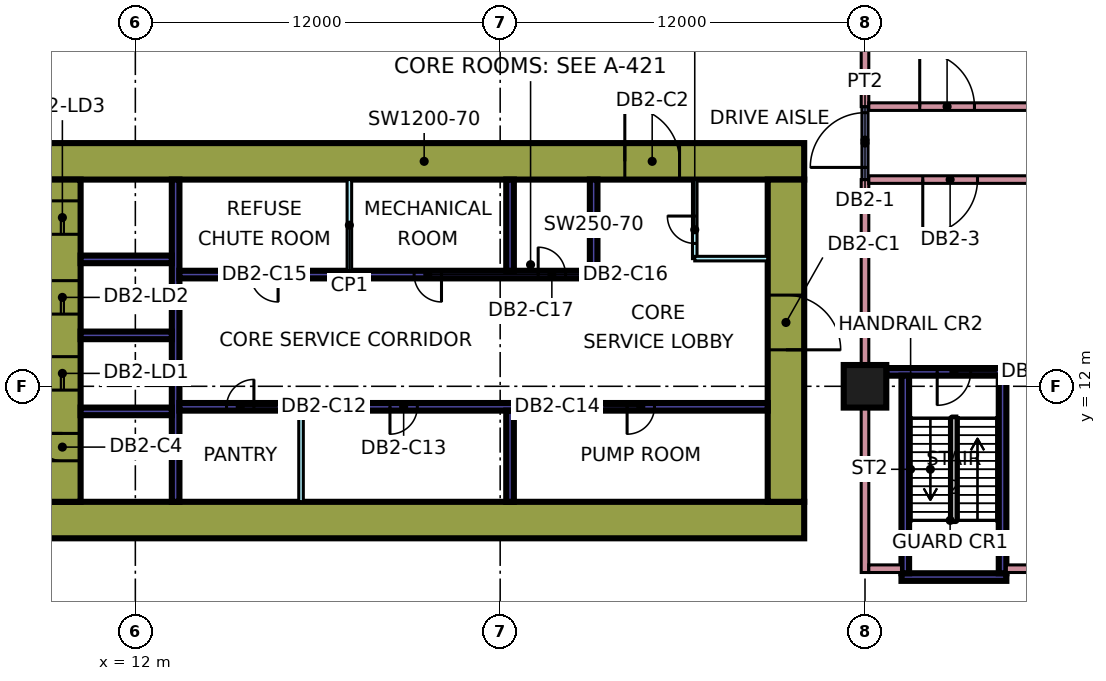
"""IFC4 building model, lengths in metres.
Left out: names, types, materials, properties, quantities, classifications, styles, units other than length and angle.
Written with IfcOpenShell. Run it as: python <this file> out.ifc"""

import sys

from ifc_helpers import new_model, si_unit, direction, frame, frame_2d, origin, origin_2d, place, context, subcontext, project, spatial, rectangle, extrude, element, fill, save


model = new_model("IFC4")
c1 = context("Model", 3, precision=1e-05, world=origin(), true_north=direction((0.0, 1.0)))
c2 = subcontext(c1, "Body", "Model", "MODEL_VIEW")
j1 = project(units=[si_unit("LENGTHUNIT", "METRE"), si_unit("PLANEANGLEUNIT", "RADIAN")], contexts=[c1])
p1 = place(None, origin())
s1 = spatial("IfcSite", under=j1, at=p1, CompositionType="ELEMENT")
p2 = place(p1, origin())
s2 = spatial("IfcBuilding", under=s1, at=p2, CompositionType="ELEMENT")
p3 = place(p2, frame((0.0, 0.0, -9.0)))
s3 = spatial("IfcBuildingStorey", under=s2, at=p3, CompositionType="ELEMENT", Elevation=-9.0)
p4 = place(p3, frame((36.0, 12.0, 0.0), z_axis=(0.0, 0.0, 1.0), x_axis=(1.0, 0.0, 0.0)))
e1 = element("IfcColumn", 1, at=p4, inside=s3, PredefinedType="COLUMN", context=c2, shape_type="SweptSolid", body=[
    extrude(rectangle(XDim=1.4, YDim=1.4, at=origin_2d()), origin(), (0.0, 0.0, 1.0), 4.5),
])
p5 = place(p3, frame((9.0, 7.6, 0.0), z_axis=(0.0, 0.0, 1.0), x_axis=(1.0, 0.0, 0.0)))
e2 = element("IfcWall", 2, at=p5, inside=s3, PredefinedType="SHEAR", context=c2, shape_type="SweptSolid", body=[
    extrude(rectangle(XDim=25.0, YDim=1.2, at=frame_2d((12.5, 0.0))), origin(), (0.0, 0.0, 1.0), 4.5),
])
p6 = place(p3, frame((9.0, 19.4, 0.0), z_axis=(0.0, 0.0, 1.0), x_axis=(1.0, 0.0, 0.0)))
e3 = element("IfcWall", 3, at=p6, inside=s3, PredefinedType="SHEAR", context=c2, shape_type="SweptSolid", body=[
    extrude(rectangle(XDim=25.0, YDim=1.2, at=frame_2d((12.5, 0.0))), origin(), (0.0, 0.0, 1.0), 4.5),
])
p7 = place(p6, frame((19.1, 0.0, 0.0)))
e4 = element("IfcOpeningElement", 4, at=p7, cuts=e3, PredefinedType="OPENING", context=c2, shape_type="SweptSolid", body=[
    extrude(rectangle(XDim=1.8, YDim=2.4, at=frame_2d((0.9, 1.2))), frame((0.0, 0.61, 0.0), z_axis=(0.0, -1.0, 0.0), x_axis=(1.0, 0.0, 0.0)), (0.0, 0.0, 1.0), 1.22),
])
p8 = place(p3, frame((9.6, 8.2, 0.0), z_axis=(0.0, 0.0, 1.0), x_axis=(0.0, 1.0, 0.0)))
e5 = element("IfcWall", 5, at=p8, inside=s3, PredefinedType="SHEAR", context=c2, shape_type="SweptSolid", body=[
    extrude(rectangle(XDim=10.6, YDim=1.2, at=frame_2d((5.3, 0.0))), origin(), (0.0, 0.0, 1.0), 4.5),
])
p9 = place(p8, frame((3.675, 0.0, 0.0)))
e6 = element("IfcOpeningElement", 6, at=p9, cuts=e5, PredefinedType="OPENING", context=c2, shape_type="SweptSolid", body=[
    extrude(rectangle(XDim=1.1, YDim=2.2, at=frame_2d((0.55, 1.1))), frame((0.0, 0.61, 0.0), z_axis=(0.0, -1.0, 0.0), x_axis=(1.0, 0.0, 0.0)), (0.0, 0.0, 1.0), 1.22),
])
p10 = place(p8, frame((6.175, 0.0, 0.0)))
e7 = element("IfcOpeningElement", 7, at=p10, cuts=e5, PredefinedType="OPENING", context=c2, shape_type="SweptSolid", body=[
    extrude(rectangle(XDim=1.1, YDim=2.2, at=frame_2d((0.55, 1.1))), frame((0.0, 0.61, 0.0), z_axis=(0.0, -1.0, 0.0), x_axis=(1.0, 0.0, 0.0)), (0.0, 0.0, 1.0), 1.22),
])
p11 = place(p8, frame((8.8, 0.0, 0.0)))
e8 = element("IfcOpeningElement", 8, at=p11, cuts=e5, PredefinedType="OPENING", context=c2, shape_type="SweptSolid", body=[
    extrude(rectangle(XDim=1.1, YDim=2.2, at=frame_2d((0.55, 1.1))), frame((0.0, 0.61, 0.0), z_axis=(0.0, -1.0, 0.0), x_axis=(1.0, 0.0, 0.0)), (0.0, 0.0, 1.0), 1.22),
])
p12 = place(p8, frame((1.35, 0.0, 0.0)))
e9 = element("IfcOpeningElement", 9, at=p12, cuts=e5, PredefinedType="OPENING", context=c2, shape_type="SweptSolid", body=[
    extrude(rectangle(XDim=0.9, YDim=2.1, at=frame_2d((0.45, 1.05))), frame((0.0, 0.61, 0.0), z_axis=(0.0, -1.0, 0.0), x_axis=(1.0, 0.0, 0.0)), (0.0, 0.0, 1.0), 1.22),
])
p13 = place(p3, frame((33.4, 8.2, 0.0), z_axis=(0.0, 0.0, 1.0), x_axis=(0.0, 1.0, 0.0)))
e10 = element("IfcWall", 10, at=p13, inside=s3, PredefinedType="SHEAR", context=c2, shape_type="SweptSolid", body=[
    extrude(rectangle(XDim=10.6, YDim=1.2, at=frame_2d((5.3, 0.0))), origin(), (0.0, 0.0, 1.0), 4.5),
])
p14 = place(p13, frame((5.0, 0.0, 0.0)))
e11 = element("IfcOpeningElement", 11, at=p14, cuts=e10, PredefinedType="OPENING", context=c2, shape_type="SweptSolid", body=[
    extrude(rectangle(XDim=1.8, YDim=2.4, at=frame_2d((0.9, 1.2))), frame((0.0, 0.61, 0.0), z_axis=(0.0, -1.0, 0.0), x_axis=(1.0, 0.0, 0.0)), (0.0, 0.0, 1.0), 1.22),
])
p15 = place(p3, frame((13.325, 8.2, 0.0), z_axis=(0.0, 0.0, 1.0), x_axis=(0.0, 1.0, 0.0)))
e12 = element("IfcWall", 12, at=p15, inside=s3, PredefinedType="SHEAR", context=c2, shape_type="SweptSolid", body=[
    extrude(rectangle(XDim=10.6, YDim=0.25, at=frame_2d((5.3, 0.0))), origin(), (0.0, 0.0, 1.0), 4.5),
])
p16 = place(p3, frame((13.45, 11.325, 0.0), z_axis=(0.0, 0.0, 1.0), x_axis=(1.0, 0.0, 0.0)))
e13 = element("IfcWall", 13, at=p16, inside=s3, PredefinedType="SHEAR", context=c2, shape_type="SweptSolid", body=[
    extrude(rectangle(XDim=19.35, YDim=0.25, at=frame_2d((9.675, 0.0))), origin(), (0.0, 0.0, 1.0), 4.5),
])
p17 = place(p16, frame((1.55, 0.0, 0.0)))
e14 = element("IfcOpeningElement", 14, at=p17, cuts=e13, PredefinedType="OPENING", context=c2, shape_type="SweptSolid", body=[
    extrude(rectangle(XDim=0.9, YDim=2.1, at=frame_2d((0.45, 1.05))), frame((0.0, 0.135, 0.0), z_axis=(0.0, -1.0, 0.0), x_axis=(1.0, 0.0, 0.0)), (0.0, 0.0, 1.0), 0.27),
])
p18 = place(p16, frame((6.925, 0.0, 0.0)))
e15 = element("IfcOpeningElement", 15, at=p18, cuts=e13, PredefinedType="OPENING", context=c2, shape_type="SweptSolid", body=[
    extrude(rectangle(XDim=0.9, YDim=2.1, at=frame_2d((0.45, 1.05))), frame((0.0, 0.135, 0.0), z_axis=(0.0, -1.0, 0.0), x_axis=(1.0, 0.0, 0.0)), (0.0, 0.0, 1.0), 0.27),
])
p19 = place(p16, frame((14.725, 0.0, 0.0)))
e16 = element("IfcOpeningElement", 16, at=p19, cuts=e13, PredefinedType="OPENING", context=c2, shape_type="SweptSolid", body=[
    extrude(rectangle(XDim=0.9, YDim=2.1, at=frame_2d((0.45, 1.05))), frame((0.0, 0.135, 0.0), z_axis=(0.0, -1.0, 0.0), x_axis=(1.0, 0.0, 0.0)), (0.0, 0.0, 1.0), 0.27),
])
p20 = place(p3, frame((13.45, 15.675, 0.0), z_axis=(0.0, 0.0, 1.0), x_axis=(1.0, 0.0, 0.0)))
e17 = element("IfcWall", 17, at=p20, inside=s3, PredefinedType="SHEAR", context=c2, shape_type="SweptSolid", body=[
    extrude(rectangle(XDim=13.75, YDim=0.25, at=frame_2d((6.875, 0.0))), origin(), (0.0, 0.0, 1.0), 4.5),
])
p21 = place(p20, frame((2.345, 0.0, 0.0)))
e18 = element("IfcOpeningElement", 18, at=p21, cuts=e17, PredefinedType="OPENING", context=c2, shape_type="SweptSolid", body=[
    extrude(rectangle(XDim=0.9, YDim=2.1, at=frame_2d((0.45, 1.05))), frame((0.0, 0.135, 0.0), z_axis=(0.0, -1.0, 0.0), x_axis=(1.0, 0.0, 0.0)), (0.0, 0.0, 1.0), 0.27),
])
p22 = place(p20, frame((7.72, 0.0, 0.0)))
e19 = element("IfcOpeningElement", 19, at=p22, cuts=e17, PredefinedType="OPENING", context=c2, shape_type="SweptSolid", body=[
    extrude(rectangle(XDim=0.9, YDim=2.1, at=frame_2d((0.45, 1.05))), frame((0.0, 0.135, 0.0), z_axis=(0.0, -1.0, 0.0), x_axis=(1.0, 0.0, 0.0)), (0.0, 0.0, 1.0), 0.27),
])
p23 = place(p20, frame((11.8, 0.0, 0.0)))
e20 = element("IfcOpeningElement", 20, at=p23, cuts=e17, PredefinedType="OPENING", context=c2, shape_type="SweptSolid", body=[
    extrude(rectangle(XDim=0.9, YDim=2.1, at=frame_2d((0.45, 1.05))), frame((0.0, 0.135, 0.0), z_axis=(0.0, -1.0, 0.0), x_axis=(1.0, 0.0, 0.0)), (0.0, 0.0, 1.0), 0.27),
])
for number, where, z_axis, x_axis in (
    (21, (10.2, 11.175, 0.0), (0.0, 0.0, 1.0), (1.0, 0.0, 0.0)),
    (22, (10.2, 13.675, 0.0), (0.0, 0.0, 1.0), (1.0, 0.0, 0.0)),
    (23, (10.2, 16.175, 0.0), (0.0, 0.0, 1.0), (1.0, 0.0, 0.0)),
    (24, (24.325, 8.2, 0.0), (0.0, 0.0, 1.0), (0.0, 1.0, 0.0)),
    (25, (24.325, 15.8, 0.0), (0.0, 0.0, 1.0), (0.0, 1.0, 0.0)),
    (26, (27.075, 15.8, 0.0), (0.0, 0.0, 1.0), (0.0, 1.0, 0.0)),
):
    element("IfcWall", number, at=place(p3, frame(where, z_axis=z_axis, x_axis=x_axis)), inside=s3, PredefinedType="SHEAR", context=c2, shape_type="SweptSolid", body=[
        extrude(rectangle(XDim=3.0, YDim=0.25, at=frame_2d((1.5, 0.0))), origin(), (0.0, 0.0, 1.0), 4.5),
    ])
p24 = place(p3, frame((37.2, 5.725, 0.0), z_axis=(0.0, 0.0, 1.0), x_axis=(1.0, 0.0, 0.0)))
e27 = element("IfcWall", 27, at=p24, inside=s3, PredefinedType="SHEAR", context=c2, shape_type="SweptSolid", body=[
    extrude(rectangle(XDim=3.45, YDim=0.25, at=frame_2d((1.725, 0.0))), origin(), (0.0, 0.0, 1.0), 4.5),
])
p25 = place(p3, frame((36.7, 12.475, 0.0), z_axis=(0.0, 0.0, 1.0), x_axis=(1.0, 0.0, 0.0)))
e28 = element("IfcWall", 28, at=p25, inside=s3, PredefinedType="SHEAR", context=c2, shape_type="SweptSolid", body=[
    extrude(rectangle(XDim=3.95, YDim=0.25, at=frame_2d((1.975, 0.0))), origin(), (0.0, 0.0, 1.0), 4.5),
])
p26 = place(p25, frame((1.675, 0.0, 0.0)))
e29 = element("IfcOpeningElement", 29, at=p26, cuts=e28, PredefinedType="OPENING", context=c2, shape_type="SweptSolid", body=[
    extrude(rectangle(XDim=1.1, YDim=2.2, at=frame_2d((0.55, 1.1))), frame((0.0, 0.135, 0.0), z_axis=(0.0, -1.0, 0.0), x_axis=(1.0, 0.0, 0.0)), (0.0, 0.0, 1.0), 0.27),
])
for number, where, z_axis, x_axis in (
    (30, (37.325, 5.85, 0.0), (0.0, 0.0, 1.0), (0.0, 1.0, 0.0)),
    (31, (40.525, 5.85, 0.0), (0.0, 0.0, 1.0), (0.0, 1.0, 0.0)),
):
    element("IfcWall", number, at=place(p3, frame(where, z_axis=z_axis, x_axis=x_axis)), inside=s3, PredefinedType="SHEAR", context=c2, shape_type="SweptSolid", body=[
        extrude(rectangle(XDim=6.5, YDim=0.25, at=frame_2d((3.25, 0.0))), origin(), (0.0, 0.0, 1.0), 4.5),
    ])
for number, where, z_axis, x_axis in (
    (32, (17.45, 8.2, 0.0), (0.0, 0.0, 1.0), (0.0, 1.0, 0.0)),
    (33, (19.04, 15.8, 0.0), (0.0, 0.0, 1.0), (0.0, 1.0, 0.0)),
):
    element("IfcWall", number, at=place(p3, frame(where, z_axis=z_axis, x_axis=x_axis)), inside=s3, PredefinedType="PARTITIONING", context=c2, shape_type="SweptSolid", body=[
        extrude(rectangle(XDim=3.0, YDim=0.15, at=frame_2d((1.5, 0.0))), origin(), (0.0, 0.0, 1.0), 4.05),
    ])
p27 = place(p3, frame((30.4, 16.2, 0.0), z_axis=(0.0, 0.0, 1.0), x_axis=(0.0, 1.0, 0.0)))
e34 = element("IfcWall", 34, at=p27, inside=s3, PredefinedType="PARTITIONING", context=c2, shape_type="SweptSolid", body=[
    extrude(rectangle(XDim=2.6, YDim=0.15, at=frame_2d((1.3, 0.0))), origin(), (0.0, 0.0, 1.0), 4.05),
])
p28 = place(p27, frame((0.5, 0.0, 0.0)))
e35 = element("IfcOpeningElement", 35, at=p28, cuts=e34, PredefinedType="OPENING", context=c2, shape_type="SweptSolid", body=[
    extrude(rectangle(XDim=0.9, YDim=2.1, at=frame_2d((0.45, 1.05))), frame((0.0, 0.085, 0.0), z_axis=(0.0, -1.0, 0.0), x_axis=(1.0, 0.0, 0.0)), (0.0, 0.0, 1.0), 0.17),
])
p29 = place(p3, frame((30.4, 16.2, 0.0), z_axis=(0.0, 0.0, 1.0), x_axis=(1.0, 0.0, 0.0)))
e36 = element("IfcWall", 36, at=p29, inside=s3, PredefinedType="PARTITIONING", context=c2, shape_type="SweptSolid", body=[
    extrude(rectangle(XDim=2.4, YDim=0.15, at=frame_2d((1.2, 0.0))), origin(), (0.0, 0.0, 1.0), 4.05),
])
p30 = place(p3, frame((36.0, 5.875, 0.0), z_axis=(0.0, 0.0, 1.0), x_axis=(0.0, 1.0, 0.0)))
e37 = element("IfcWall", 37, at=p30, inside=s3, PredefinedType="PARTITIONING", context=c2, shape_type="SweptSolid", body=[
    extrude(rectangle(XDim=5.426, YDim=0.25, at=frame_2d((2.713, 0.0))), origin(), (0.0, 0.0, 1.0), 4.05),
])
p31 = place(p3, frame((36.0, 12.699, 0.0), z_axis=(0.0, 0.0, 1.0), x_axis=(0.0, 1.0, 0.0)))
e38 = element("IfcWall", 38, at=p31, inside=s3, PredefinedType="PARTITIONING", context=c2, shape_type="SweptSolid", body=[
    extrude(rectangle(XDim=6.101, YDim=0.25, at=frame_2d((3.051, 0.0))), origin(), (0.0, 0.0, 1.0), 4.05),
])
p32 = place(p3, frame((36.0, 18.8, 0.0), z_axis=(0.0, 0.0, 1.0), x_axis=(0.0, 1.0, 0.0)))
e39 = element("IfcWall", 39, at=p32, inside=s3, PredefinedType="PARTITIONING", context=c2, shape_type="SweptSolid", body=[
    extrude(rectangle(XDim=2.4, YDim=0.2, at=frame_2d((1.2, 0.0))), origin(), (0.0, 0.0, 1.0), 4.05),
])
p33 = place(p32, frame((0.4, 0.0, 0.0)))
e40 = element("IfcOpeningElement", 40, at=p33, cuts=e39, PredefinedType="OPENING", context=c2, shape_type="SweptSolid", body=[
    extrude(rectangle(XDim=1.8, YDim=2.1, at=frame_2d((0.9, 1.05))), frame((0.0, 0.11, 0.0), z_axis=(0.0, -1.0, 0.0), x_axis=(1.0, 0.0, 0.0)), (0.0, 0.0, 1.0), 0.22),
])
p34 = place(p3, frame((36.0, 21.2, 0.0), z_axis=(0.0, 0.0, 1.0), x_axis=(0.0, 1.0, 0.0)))
e41 = element("IfcWall", 41, at=p34, inside=s3, PredefinedType="PARTITIONING", context=c2, shape_type="SweptSolid", body=[
    extrude(rectangle(XDim=2.101, YDim=0.25, at=frame_2d((1.051, 0.0))), origin(), (0.0, 0.0, 1.0), 4.05),
])
p35 = place(p3, frame((36.125, 6.0, 0.0), z_axis=(0.0, 0.0, 1.0), x_axis=(1.0, 0.0, 0.0)))
e42 = element("IfcWall", 42, at=p35, inside=s3, PredefinedType="PARTITIONING", context=c2, shape_type="SweptSolid", body=[
    extrude(rectangle(XDim=1.075, YDim=0.25, at=frame_2d((0.538, 0.0))), origin(), (0.0, 0.0, 1.0), 4.05),
])
p36 = place(p3, frame((36.125, 18.8, 0.0), z_axis=(0.0, 0.0, 1.0), x_axis=(1.0, 0.0, 0.0)))
e43 = element("IfcWall", 43, at=p36, inside=s3, PredefinedType="PARTITIONING", context=c2, shape_type="SweptSolid", body=[
    extrude(rectangle(XDim=5.375, YDim=0.25, at=frame_2d((2.688, 0.0))), origin(), (0.0, 0.0, 1.0), 4.05),
])
p37 = place(p36, frame((1.775, 0.0, 0.0)))
e44 = element("IfcOpeningElement", 44, at=p37, cuts=e43, PredefinedType="OPENING", context=c2, shape_type="SweptSolid", body=[
    extrude(rectangle(XDim=1.8, YDim=2.1, at=frame_2d((0.9, 1.05))), frame((0.0, 0.135, 0.0), z_axis=(0.0, -1.0, 0.0), x_axis=(1.0, 0.0, 0.0)), (0.0, 0.0, 1.0), 0.27),
])
p38 = place(p3, frame((36.125, 21.2, 0.0), z_axis=(0.0, 0.0, 1.0), x_axis=(1.0, 0.0, 0.0)))
e45 = element("IfcWall", 45, at=p38, inside=s3, PredefinedType="PARTITIONING", context=c2, shape_type="SweptSolid", body=[
    extrude(rectangle(XDim=5.375, YDim=0.25, at=frame_2d((2.688, 0.0))), origin(), (0.0, 0.0, 1.0), 4.05),
])
p39 = place(p38, frame((1.675, 0.0, 0.0)))
e46 = element("IfcOpeningElement", 46, at=p39, cuts=e45, PredefinedType="OPENING", context=c2, shape_type="SweptSolid", body=[
    extrude(rectangle(XDim=1.8, YDim=2.1, at=frame_2d((0.9, 1.05))), frame((0.0, 0.135, 0.0), z_axis=(0.0, -1.0, 0.0), x_axis=(1.0, 0.0, 0.0)), (0.0, 0.0, 1.0), 0.27),
])
p40 = place(p3, frame((40.65, 6.0, 0.0), z_axis=(0.0, 0.0, 1.0), x_axis=(1.0, 0.0, 0.0)))
e47 = element("IfcWall", 47, at=p40, inside=s3, PredefinedType="PARTITIONING", context=c2, shape_type="SweptSolid", body=[
    extrude(rectangle(XDim=35.475, YDim=0.25, at=frame_2d((17.738, 0.0))), origin(), (0.0, 0.0, 1.0), 4.05),
])
p41 = place(p9, origin())
e48 = element("IfcDoor", 48, at=p41, inside=s3, OperationType="DOUBLE_DOOR_SLIDING", PredefinedType="DOOR", context=c2, shape_type="SweptSolid", body=[
    extrude(rectangle(XDim=1.1, YDim=2.2, at=frame_2d((0.55, 1.1))), frame((0.0, 0.025, 0.0), z_axis=(0.0, -1.0, 0.0), x_axis=(1.0, 0.0, 0.0)), (0.0, 0.0, 1.0), 0.05),
])
fill(e6, e48)
p42 = place(p10, origin())
e49 = element("IfcDoor", 49, at=p42, inside=s3, OperationType="DOUBLE_DOOR_SLIDING", PredefinedType="DOOR", context=c2, shape_type="SweptSolid", body=[
    extrude(rectangle(XDim=1.1, YDim=2.2, at=frame_2d((0.55, 1.1))), frame((0.0, 0.025, 0.0), z_axis=(0.0, -1.0, 0.0), x_axis=(1.0, 0.0, 0.0)), (0.0, 0.0, 1.0), 0.05),
])
fill(e7, e49)
p43 = place(p11, origin())
e50 = element("IfcDoor", 50, at=p43, inside=s3, OperationType="DOUBLE_DOOR_SLIDING", PredefinedType="DOOR", context=c2, shape_type="SweptSolid", body=[
    extrude(rectangle(XDim=1.1, YDim=2.2, at=frame_2d((0.55, 1.1))), frame((0.0, 0.025, 0.0), z_axis=(0.0, -1.0, 0.0), x_axis=(1.0, 0.0, 0.0)), (0.0, 0.0, 1.0), 0.05),
])
fill(e8, e50)
p44 = place(p14, frame((1.8, 0.0, 0.0), z_axis=(0.0, 0.0, 1.0), x_axis=(-1.0, 0.0, 0.0)))
e51 = element("IfcDoor", 51, at=p44, inside=s3, OperationType="DOUBLE_DOOR_SINGLE_SWING", PredefinedType="DOOR", context=c2, shape_type="SweptSolid", body=[
    extrude(rectangle(XDim=1.8, YDim=2.4, at=frame_2d((0.9, 1.2))), frame((0.0, 0.025, 0.0), z_axis=(0.0, -1.0, 0.0), x_axis=(1.0, 0.0, 0.0)), (0.0, 0.0, 1.0), 0.05),
])
fill(e11, e51)
p45 = place(p7, origin())
e52 = element("IfcDoor", 52, at=p45, inside=s3, OperationType="DOUBLE_DOOR_SINGLE_SWING", PredefinedType="DOOR", context=c2, shape_type="SweptSolid", body=[
    extrude(rectangle(XDim=1.8, YDim=2.4, at=frame_2d((0.9, 1.2))), frame((0.0, 0.025, 0.0), z_axis=(0.0, -1.0, 0.0), x_axis=(1.0, 0.0, 0.0)), (0.0, 0.0, 1.0), 0.05),
])
fill(e4, e52)
p46 = place(p12, frame((0.9, 0.0, 0.0), z_axis=(0.0, 0.0, 1.0), x_axis=(-1.0, 0.0, 0.0)))
e53 = element("IfcDoor", 53, at=p46, inside=s3, OperationType="SINGLE_SWING_RIGHT", PredefinedType="DOOR", context=c2, shape_type="SweptSolid", body=[
    extrude(rectangle(XDim=0.9, YDim=2.1, at=frame_2d((0.45, 1.05))), frame((0.0, 0.025, 0.0), z_axis=(0.0, -1.0, 0.0), x_axis=(1.0, 0.0, 0.0)), (0.0, 0.0, 1.0), 0.05),
])
fill(e9, e53)
p47 = place(p26, frame((1.1, 0.0, 0.0), z_axis=(0.0, 0.0, 1.0), x_axis=(-1.0, 0.0, 0.0)))
e54 = element("IfcDoor", 54, at=p47, inside=s3, OperationType="SINGLE_SWING_LEFT", PredefinedType="DOOR", context=c2, shape_type="SweptSolid", body=[
    extrude(rectangle(XDim=1.1, YDim=2.2, at=frame_2d((0.55, 1.1))), frame((0.0, 0.025, 0.0), z_axis=(0.0, -1.0, 0.0), x_axis=(1.0, 0.0, 0.0)), (0.0, 0.0, 1.0), 0.05),
])
fill(e29, e54)
p48 = place(p17, frame((0.9, 0.0, 0.0), z_axis=(0.0, 0.0, 1.0), x_axis=(-1.0, 0.0, 0.0)))
e55 = element("IfcDoor", 55, at=p48, inside=s3, OperationType="SINGLE_SWING_RIGHT", PredefinedType="DOOR", context=c2, shape_type="SweptSolid", body=[
    extrude(rectangle(XDim=0.9, YDim=2.1, at=frame_2d((0.45, 1.05))), frame((0.0, 0.025, 0.0), z_axis=(0.0, -1.0, 0.0), x_axis=(1.0, 0.0, 0.0)), (0.0, 0.0, 1.0), 0.05),
])
fill(e14, e55)
p49 = place(p18, frame((0.9, 0.0, 0.0), z_axis=(0.0, 0.0, 1.0), x_axis=(-1.0, 0.0, 0.0)))
e56 = element("IfcDoor", 56, at=p49, inside=s3, OperationType="SINGLE_SWING_LEFT", PredefinedType="DOOR", context=c2, shape_type="SweptSolid", body=[
    extrude(rectangle(XDim=0.9, YDim=2.1, at=frame_2d((0.45, 1.05))), frame((0.0, 0.025, 0.0), z_axis=(0.0, -1.0, 0.0), x_axis=(1.0, 0.0, 0.0)), (0.0, 0.0, 1.0), 0.05),
])
fill(e15, e56)
p50 = place(p19, frame((0.9, 0.0, 0.0), z_axis=(0.0, 0.0, 1.0), x_axis=(-1.0, 0.0, 0.0)))
e57 = element("IfcDoor", 57, at=p50, inside=s3, OperationType="SINGLE_SWING_LEFT", PredefinedType="DOOR", context=c2, shape_type="SweptSolid", body=[
    extrude(rectangle(XDim=0.9, YDim=2.1, at=frame_2d((0.45, 1.05))), frame((0.0, 0.025, 0.0), z_axis=(0.0, -1.0, 0.0), x_axis=(1.0, 0.0, 0.0)), (0.0, 0.0, 1.0), 0.05),
])
fill(e16, e57)
p51 = place(p21, origin())
e58 = element("IfcDoor", 58, at=p51, inside=s3, OperationType="SINGLE_SWING_RIGHT", PredefinedType="DOOR", context=c2, shape_type="SweptSolid", body=[
    extrude(rectangle(XDim=0.9, YDim=2.1, at=frame_2d((0.45, 1.05))), frame((0.0, 0.025, 0.0), z_axis=(0.0, -1.0, 0.0), x_axis=(1.0, 0.0, 0.0)), (0.0, 0.0, 1.0), 0.05),
])
fill(e18, e58)
p52 = place(p22, origin())
e59 = element("IfcDoor", 59, at=p52, inside=s3, OperationType="SINGLE_SWING_RIGHT", PredefinedType="DOOR", context=c2, shape_type="SweptSolid", body=[
    extrude(rectangle(XDim=0.9, YDim=2.1, at=frame_2d((0.45, 1.05))), frame((0.0, 0.025, 0.0), z_axis=(0.0, -1.0, 0.0), x_axis=(1.0, 0.0, 0.0)), (0.0, 0.0, 1.0), 0.05),
])
fill(e19, e59)
p53 = place(p23, origin())
e60 = element("IfcDoor", 60, at=p53, inside=s3, OperationType="SINGLE_SWING_LEFT", PredefinedType="DOOR", context=c2, shape_type="SweptSolid", body=[
    extrude(rectangle(XDim=0.9, YDim=2.1, at=frame_2d((0.45, 1.05))), frame((0.0, 0.025, 0.0), z_axis=(0.0, -1.0, 0.0), x_axis=(1.0, 0.0, 0.0)), (0.0, 0.0, 1.0), 0.05),
])
fill(e20, e60)
p54 = place(p28, frame((0.9, 0.0, 0.0), z_axis=(0.0, 0.0, 1.0), x_axis=(-1.0, 0.0, 0.0)))
e61 = element("IfcDoor", 61, at=p54, inside=s3, OperationType="SINGLE_SWING_RIGHT", PredefinedType="DOOR", context=c2, shape_type="SweptSolid", body=[
    extrude(rectangle(XDim=0.9, YDim=2.1, at=frame_2d((0.45, 1.05))), frame((0.0, 0.025, 0.0), z_axis=(0.0, -1.0, 0.0), x_axis=(1.0, 0.0, 0.0)), (0.0, 0.0, 1.0), 0.05),
])
fill(e35, e61)
p55 = place(p33, origin())
e62 = element("IfcDoor", 62, at=p55, inside=s3, OperationType="DOUBLE_DOOR_SINGLE_SWING", PredefinedType="DOOR", context=c2, shape_type="SweptSolid", body=[
    extrude(rectangle(XDim=1.8, YDim=2.1, at=frame_2d((0.9, 1.05))), frame((0.0, 0.025, 0.0), z_axis=(0.0, -1.0, 0.0), x_axis=(1.0, 0.0, 0.0)), (0.0, 0.0, 1.0), 0.05),
])
fill(e40, e62)
p56 = place(p37, frame((1.8, 0.0, 0.0), z_axis=(0.0, 0.0, 1.0), x_axis=(-1.0, 0.0, 0.0)))
e63 = element("IfcDoor", 63, at=p56, inside=s3, OperationType="DOUBLE_DOOR_SINGLE_SWING", PredefinedType="DOOR", context=c2, shape_type="SweptSolid", body=[
    extrude(rectangle(XDim=1.8, YDim=2.1, at=frame_2d((0.9, 1.05))), frame((0.0, 0.025, 0.0), z_axis=(0.0, -1.0, 0.0), x_axis=(1.0, 0.0, 0.0)), (0.0, 0.0, 1.0), 0.05),
])
fill(e44, e63)
p57 = place(p39, origin())
e64 = element("IfcDoor", 64, at=p57, inside=s3, OperationType="DOUBLE_DOOR_SINGLE_SWING", PredefinedType="DOOR", context=c2, shape_type="SweptSolid", body=[
    extrude(rectangle(XDim=1.8, YDim=2.1, at=frame_2d((0.9, 1.05))), frame((0.0, 0.025, 0.0), z_axis=(0.0, -1.0, 0.0), x_axis=(1.0, 0.0, 0.0)), (0.0, 0.0, 1.0), 0.05),
])
fill(e46, e64)
save(model, sys.argv[1])
